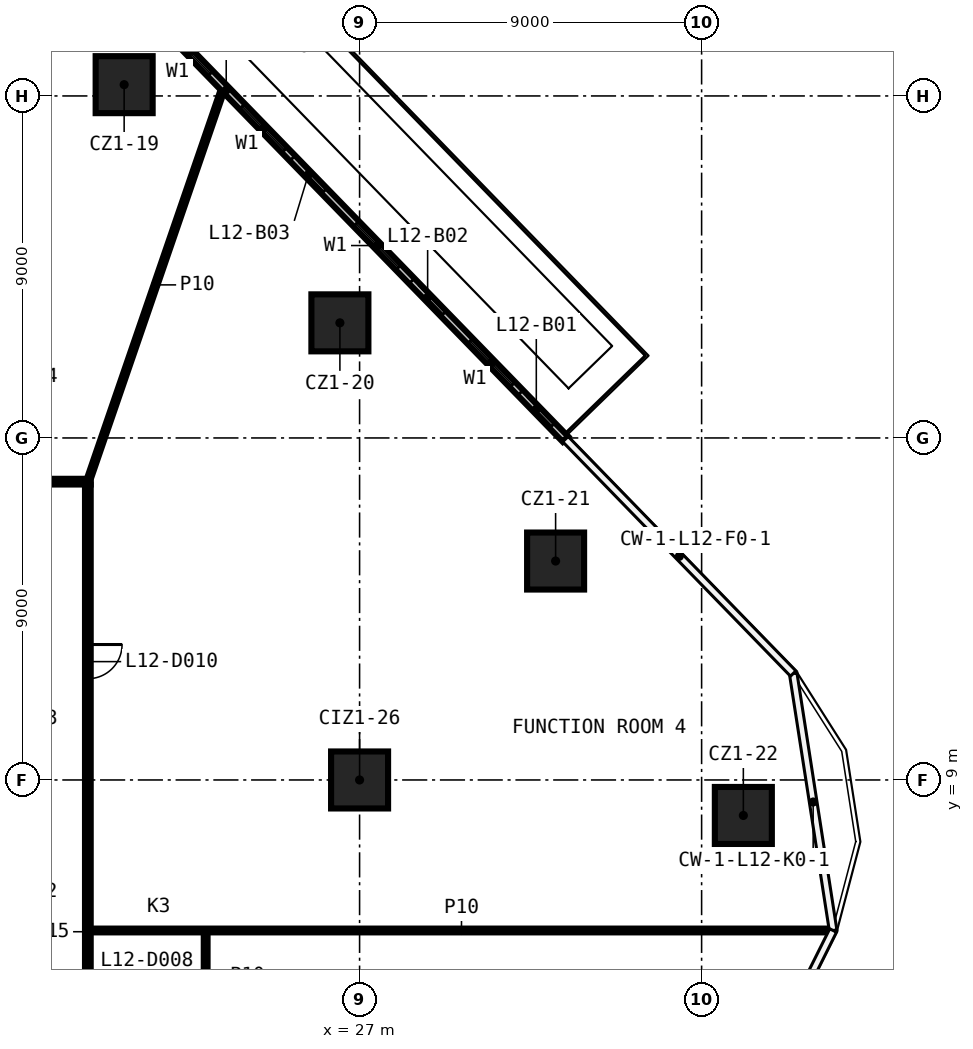
"""IFC4 building model, lengths in metres.
Left out: names, types, materials, properties, quantities, classifications, styles, units other than length and angle.
Written with IfcOpenShell. Run it as: python <this file> out.ifc"""

import sys

from ifc_helpers import new_model, si_unit, direction, frame, frame_2d, origin, origin_2d, place, context, subcontext, project, spatial, rectangle, extrude, element, fill, save


model = new_model("IFC4")
c1 = context("Model", 3, precision=1e-05, world=origin(), true_north=direction((0.0, 1.0)))
c2 = subcontext(c1, "Body", "Model", "MODEL_VIEW")
j1 = project(units=[si_unit("LENGTHUNIT", "METRE"), si_unit("PLANEANGLEUNIT", "RADIAN")], contexts=[c1])
p1 = place(None, origin())
s1 = spatial("IfcSite", under=j1, at=p1, CompositionType="ELEMENT")
p2 = place(p1, origin())
s2 = spatial("IfcBuilding", under=s1, at=p2, CompositionType="ELEMENT")
p3 = place(p2, frame((0.0, 0.0, 66.2)))
s3 = spatial("IfcBuildingStorey", under=s2, at=p3, CompositionType="ELEMENT", Elevation=66.2)
for number, where, z_axis, x_axis in (
    (1, (20.805, 27.297, 0.0), (0.0, 0.0, 1.0), (1.0, 0.0, 0.0)),
    (2, (26.482, 21.029, 0.0), (0.0, 0.0, 1.0), (1.0, 0.0, 0.0)),
    (3, (32.158, 14.761, 0.0), (0.0, 0.0, 1.0), (1.0, 0.0, 0.0)),
    (4, (37.098, 8.066, 0.0), (0.0, 0.0, 1.0), (1.0, 0.0, 0.0)),
    (5, (27.0, 9.0, 0.0), (0.0, 0.0, 1.0), (1.0, 0.0, 0.0)),
):
    element("IfcColumn", number, at=place(p3, frame(where, z_axis=z_axis, x_axis=x_axis)), inside=s3, PredefinedType="COLUMN", context=c2, shape_type="SweptSolid", body=[
        extrude(rectangle(XDim=1.5, YDim=1.5, at=origin_2d()), origin(), (0.0, 0.0, 1.0), 3.3),
    ])
p4 = place(p3, frame((19.925, 5.039, 0.0), z_axis=(0.0, 0.0, 1.0), x_axis=(1.0, 0.0, 0.0)))
e6 = element("IfcWall", 6, at=p4, inside=s3, PredefinedType="PARTITIONING", context=c2, shape_type="SweptSolid", body=[
    extrude(rectangle(XDim=19.513, YDim=0.1, at=frame_2d((9.757, 0.0))), origin(), (0.0, 0.0, 1.0), 3.3),
])
p5 = place(p3, frame((-19.925, 16.85, 0.0), z_axis=(0.0, 0.0, 1.0), x_axis=(1.0, 0.0, 0.0)))
e7 = element("IfcWall", 7, at=p5, inside=s3, PredefinedType="PARTITIONING", context=c2, shape_type="SweptSolid", body=[
    extrude(rectangle(XDim=39.85, YDim=0.15, at=frame_2d((19.925, 0.0))), origin(), (0.0, 0.0, 1.0), 3.3),
])
p6 = place(p5, frame((31.436, 0.0, 0.0)))
e8 = element("IfcOpeningElement", 8, at=p6, cuts=e7, PredefinedType="OPENING", context=c2, shape_type="SweptSolid", body=[
    extrude(rectangle(XDim=0.9, YDim=2.1, at=frame_2d((0.45, 1.05))), frame((0.0, 0.085, 0.0), z_axis=(0.0, -1.0, 0.0), x_axis=(1.0, 0.0, 0.0)), (0.0, 0.0, 1.0), 0.17),
])
p7 = place(p5, frame((16.954, 0.0, 0.0)))
e9 = element("IfcOpeningElement", 9, at=p7, cuts=e7, PredefinedType="OPENING", context=c2, shape_type="SweptSolid", body=[
    extrude(rectangle(XDim=0.9, YDim=2.1, at=frame_2d((0.45, 1.05))), frame((0.0, 0.085, 0.0), z_axis=(0.0, -1.0, 0.0), x_axis=(1.0, 0.0, 0.0)), (0.0, 0.0, 1.0), 0.17),
])
p8 = place(p5, frame((7.208, 0.0, 0.0)))
e10 = element("IfcOpeningElement", 10, at=p8, cuts=e7, PredefinedType="OPENING", context=c2, shape_type="SweptSolid", body=[
    extrude(rectangle(XDim=0.9, YDim=2.1, at=frame_2d((0.45, 1.05))), frame((0.0, 0.085, 0.0), z_axis=(0.0, -1.0, 0.0), x_axis=(1.0, 0.0, 0.0)), (0.0, 0.0, 1.0), 0.17),
])
p9 = place(p3, frame((19.85, 16.85, 0.0), z_axis=(0.0, 0.0, 1.0), x_axis=(0.32525482398, 0.94562640587, 0.0)))
e11 = element("IfcWall", 11, at=p9, inside=s3, PredefinedType="PARTITIONING", context=c2, shape_type="SweptSolid", body=[
    extrude(rectangle(XDim=10.952, YDim=0.1, at=frame_2d((5.476, 0.0))), origin(), (0.0, 0.0, 1.0), 3.3),
])
p10 = place(p3, frame((22.95, 2.689, 0.0), z_axis=(0.0, 0.0, 1.0), x_axis=(0.0, 1.0, 0.0)))
e12 = element("IfcWall", 12, at=p10, inside=s3, PredefinedType="PARTITIONING", context=c2, shape_type="SweptSolid", body=[
    extrude(rectangle(XDim=2.3, YDim=0.1, at=frame_2d((1.15, 0.0))), origin(), (0.0, 0.0, 1.0), 3.3),
])
p11 = place(p3, frame((19.85, 16.775, 0.0), z_axis=(0.0, 0.0, 1.0), x_axis=(0.0, -1.0, 0.0)))
e13 = element("IfcWall", 13, at=p11, inside=s3, PredefinedType="PARTITIONING", context=c2, shape_type="SweptSolid", body=[
    extrude(rectangle(XDim=33.55, YDim=0.15, at=frame_2d((16.775, 0.0))), origin(), (0.0, 0.0, 1.0), 3.3),
])
p12 = place(p11, frame((21.293, 0.0, 0.0)))
e14 = element("IfcOpeningElement", 14, at=p12, cuts=e13, PredefinedType="OPENING", context=c2, shape_type="SweptSolid", body=[
    extrude(rectangle(XDim=1.0, YDim=2.1, at=frame_2d((0.5, 1.05))), frame((0.0, 0.085, 0.0), z_axis=(0.0, -1.0, 0.0), x_axis=(1.0, 0.0, 0.0)), (0.0, 0.0, 1.0), 0.17),
])
p13 = place(p11, frame((18.427, 0.0, 0.0)))
e15 = element("IfcOpeningElement", 15, at=p13, cuts=e13, PredefinedType="OPENING", context=c2, shape_type="SweptSolid", body=[
    extrude(rectangle(XDim=1.0, YDim=2.1, at=frame_2d((0.5, 1.05))), frame((0.0, 0.085, 0.0), z_axis=(0.0, -1.0, 0.0), x_axis=(1.0, 0.0, 0.0)), (0.0, 0.0, 1.0), 0.17),
])
p14 = place(p11, frame((4.211, 0.0, 0.0)))
e16 = element("IfcOpeningElement", 16, at=p14, cuts=e13, PredefinedType="OPENING", context=c2, shape_type="SweptSolid", body=[
    extrude(rectangle(XDim=0.9, YDim=2.1, at=frame_2d((0.45, 1.05))), frame((0.0, 0.085, 0.0), z_axis=(0.0, -1.0, 0.0), x_axis=(1.0, 0.0, 0.0)), (0.0, 0.0, 1.0), 0.17),
])
p15 = place(p3, frame((32.417, 17.969, 0.0), z_axis=(0.0, 0.0, 1.0), x_axis=(-0.696878416696, 0.717189286272, 0.0)))
e17 = element("IfcWall", 17, at=p15, inside=s3, PredefinedType="SOLIDWALL", context=c2, shape_type="SweptSolid", body=[
    extrude(rectangle(XDim=21.516, YDim=0.2, at=frame_2d((10.758, 0.0))), origin(), (0.0, 0.0, 1.0), 3.3),
])
p16 = place(p15, frame((2.0, 0.0, 0.6)))
e18 = element("IfcOpeningElement", 18, at=p16, cuts=e17, PredefinedType="OPENING", context=c2, shape_type="SweptSolid", body=[
    extrude(rectangle(XDim=1.6, YDim=2.4, at=frame_2d((0.8, 1.2))), frame((0.0, 0.11, 0.0), z_axis=(0.0, -1.0, 0.0), x_axis=(1.0, 0.0, 0.0)), (0.0, 0.0, 1.0), 0.22),
])
p17 = place(p15, frame((0.5, 0.0, 0.0)))
e19 = element("IfcOpeningElement", 19, at=p17, cuts=e17, PredefinedType="OPENING", context=c2, shape_type="SweptSolid", body=[
    extrude(rectangle(XDim=1.2, YDim=2.4, at=frame_2d((0.6, 1.2))), frame((0.0, 0.11, 0.0), z_axis=(0.0, -1.0, 0.0), x_axis=(1.0, 0.0, 0.0)), (0.0, 0.0, 1.0), 0.22),
])
p18 = place(p15, frame((6.303, 0.0, 0.6)))
e20 = element("IfcOpeningElement", 20, at=p18, cuts=e17, PredefinedType="OPENING", context=c2, shape_type="SweptSolid", body=[
    extrude(rectangle(XDim=1.6, YDim=2.4, at=frame_2d((0.8, 1.2))), frame((0.0, 0.11, 0.0), z_axis=(0.0, -1.0, 0.0), x_axis=(1.0, 0.0, 0.0)), (0.0, 0.0, 1.0), 0.22),
])
p19 = place(p15, frame((4.603, 0.0, 0.0)))
e21 = element("IfcOpeningElement", 21, at=p19, cuts=e17, PredefinedType="OPENING", context=c2, shape_type="SweptSolid", body=[
    extrude(rectangle(XDim=1.2, YDim=2.4, at=frame_2d((0.6, 1.2))), frame((0.0, 0.11, 0.0), z_axis=(0.0, -1.0, 0.0), x_axis=(1.0, 0.0, 0.0)), (0.0, 0.0, 1.0), 0.22),
])
p20 = place(p15, frame((10.606, 0.0, 0.6)))
e22 = element("IfcOpeningElement", 22, at=p20, cuts=e17, PredefinedType="OPENING", context=c2, shape_type="SweptSolid", body=[
    extrude(rectangle(XDim=1.6, YDim=2.4, at=frame_2d((0.8, 1.2))), frame((0.0, 0.11, 0.0), z_axis=(0.0, -1.0, 0.0), x_axis=(1.0, 0.0, 0.0)), (0.0, 0.0, 1.0), 0.22),
])
p21 = place(p15, frame((9.106, 0.0, 0.0)))
e23 = element("IfcOpeningElement", 23, at=p21, cuts=e17, PredefinedType="OPENING", context=c2, shape_type="SweptSolid", body=[
    extrude(rectangle(XDim=1.2, YDim=2.4, at=frame_2d((0.6, 1.2))), frame((0.0, 0.11, 0.0), z_axis=(0.0, -1.0, 0.0), x_axis=(1.0, 0.0, 0.0)), (0.0, 0.0, 1.0), 0.22),
])
p22 = place(p15, frame((13.41, 0.0, 0.6)))
e24 = element("IfcOpeningElement", 24, at=p22, cuts=e17, PredefinedType="OPENING", context=c2, shape_type="SweptSolid", body=[
    extrude(rectangle(XDim=1.6, YDim=2.4, at=frame_2d((0.8, 1.2))), frame((0.0, 0.11, 0.0), z_axis=(0.0, -1.0, 0.0), x_axis=(1.0, 0.0, 0.0)), (0.0, 0.0, 1.0), 0.22),
])
p23 = place(p15, frame((15.51, 0.0, 0.0)))
e25 = element("IfcOpeningElement", 25, at=p23, cuts=e17, PredefinedType="OPENING", context=c2, shape_type="SweptSolid", body=[
    extrude(rectangle(XDim=1.2, YDim=2.4, at=frame_2d((0.6, 1.2))), frame((0.0, 0.11, 0.0), z_axis=(0.0, -1.0, 0.0), x_axis=(1.0, 0.0, 0.0)), (0.0, 0.0, 1.0), 0.22),
])
p24 = place(p15, frame((19.213, 0.0, 0.6)))
e26 = element("IfcOpeningElement", 26, at=p24, cuts=e17, PredefinedType="OPENING", context=c2, shape_type="SweptSolid", body=[
    extrude(rectangle(XDim=1.6, YDim=2.4, at=frame_2d((0.8, 1.2))), frame((0.0, 0.11, 0.0), z_axis=(0.0, -1.0, 0.0), x_axis=(1.0, 0.0, 0.0)), (0.0, 0.0, 1.0), 0.22),
])
p25 = place(p15, frame((17.713, 0.0, 0.0)))
e27 = element("IfcOpeningElement", 27, at=p25, cuts=e17, PredefinedType="OPENING", context=c2, shape_type="SweptSolid", body=[
    extrude(rectangle(XDim=1.2, YDim=2.4, at=frame_2d((0.6, 1.2))), frame((0.0, 0.11, 0.0), z_axis=(0.0, -1.0, 0.0), x_axis=(1.0, 0.0, 0.0)), (0.0, 0.0, 1.0), 0.22),
])
p26 = place(p14, origin())
e28 = element("IfcDoor", 28, at=p26, inside=s3, OperationType="SINGLE_SWING_RIGHT", PredefinedType="DOOR", context=c2, shape_type="SweptSolid", body=[
    extrude(rectangle(XDim=0.9, YDim=2.1, at=frame_2d((0.45, 1.05))), frame((0.0, 0.025, 0.0), z_axis=(0.0, -1.0, 0.0), x_axis=(1.0, 0.0, 0.0)), (0.0, 0.0, 1.0), 0.05),
])
fill(e16, e28)
p27 = place(p16, origin())
e29 = element("IfcWindow", 29, at=p27, inside=s3, PartitioningType="SINGLE_PANEL", PredefinedType="WINDOW", context=c2, shape_type="SweptSolid", body=[
    extrude(rectangle(XDim=1.6, YDim=2.4, at=frame_2d((0.8, 1.2))), frame((0.0, 0.03, 0.0), z_axis=(0.0, -1.0, 0.0), x_axis=(1.0, 0.0, 0.0)), (0.0, 0.0, 1.0), 0.06),
])
fill(e18, e29)
p28 = place(p17, origin())
e30 = element("IfcDoor", 30, at=p28, inside=s3, OperationType="SLIDING_TO_LEFT", PredefinedType="DOOR", context=c2, shape_type="SweptSolid", body=[
    extrude(rectangle(XDim=1.2, YDim=2.4, at=frame_2d((0.6, 1.2))), frame((0.0, 0.025, 0.0), z_axis=(0.0, -1.0, 0.0), x_axis=(1.0, 0.0, 0.0)), (0.0, 0.0, 1.0), 0.05),
])
fill(e19, e30)
p29 = place(p18, origin())
e31 = element("IfcWindow", 31, at=p29, inside=s3, PartitioningType="SINGLE_PANEL", PredefinedType="WINDOW", context=c2, shape_type="SweptSolid", body=[
    extrude(rectangle(XDim=1.6, YDim=2.4, at=frame_2d((0.8, 1.2))), frame((0.0, 0.03, 0.0), z_axis=(0.0, -1.0, 0.0), x_axis=(1.0, 0.0, 0.0)), (0.0, 0.0, 1.0), 0.06),
])
fill(e20, e31)
p30 = place(p19, origin())
e32 = element("IfcDoor", 32, at=p30, inside=s3, OperationType="SLIDING_TO_LEFT", PredefinedType="DOOR", context=c2, shape_type="SweptSolid", body=[
    extrude(rectangle(XDim=1.2, YDim=2.4, at=frame_2d((0.6, 1.2))), frame((0.0, 0.025, 0.0), z_axis=(0.0, -1.0, 0.0), x_axis=(1.0, 0.0, 0.0)), (0.0, 0.0, 1.0), 0.05),
])
fill(e21, e32)
p31 = place(p20, origin())
e33 = element("IfcWindow", 33, at=p31, inside=s3, PartitioningType="SINGLE_PANEL", PredefinedType="WINDOW", context=c2, shape_type="SweptSolid", body=[
    extrude(rectangle(XDim=1.6, YDim=2.4, at=frame_2d((0.8, 1.2))), frame((0.0, 0.03, 0.0), z_axis=(0.0, -1.0, 0.0), x_axis=(1.0, 0.0, 0.0)), (0.0, 0.0, 1.0), 0.06),
])
fill(e22, e33)
p32 = place(p21, origin())
e34 = element("IfcDoor", 34, at=p32, inside=s3, OperationType="SLIDING_TO_LEFT", PredefinedType="DOOR", context=c2, shape_type="SweptSolid", body=[
    extrude(rectangle(XDim=1.2, YDim=2.4, at=frame_2d((0.6, 1.2))), frame((0.0, 0.025, 0.0), z_axis=(0.0, -1.0, 0.0), x_axis=(1.0, 0.0, 0.0)), (0.0, 0.0, 1.0), 0.05),
])
fill(e23, e34)
p33 = place(p22, origin())
e35 = element("IfcWindow", 35, at=p33, inside=s3, PartitioningType="SINGLE_PANEL", PredefinedType="WINDOW", context=c2, shape_type="SweptSolid", body=[
    extrude(rectangle(XDim=1.6, YDim=2.4, at=frame_2d((0.8, 1.2))), frame((0.0, 0.03, 0.0), z_axis=(0.0, -1.0, 0.0), x_axis=(1.0, 0.0, 0.0)), (0.0, 0.0, 1.0), 0.06),
])
fill(e24, e35)
save(model, sys.argv[1])
